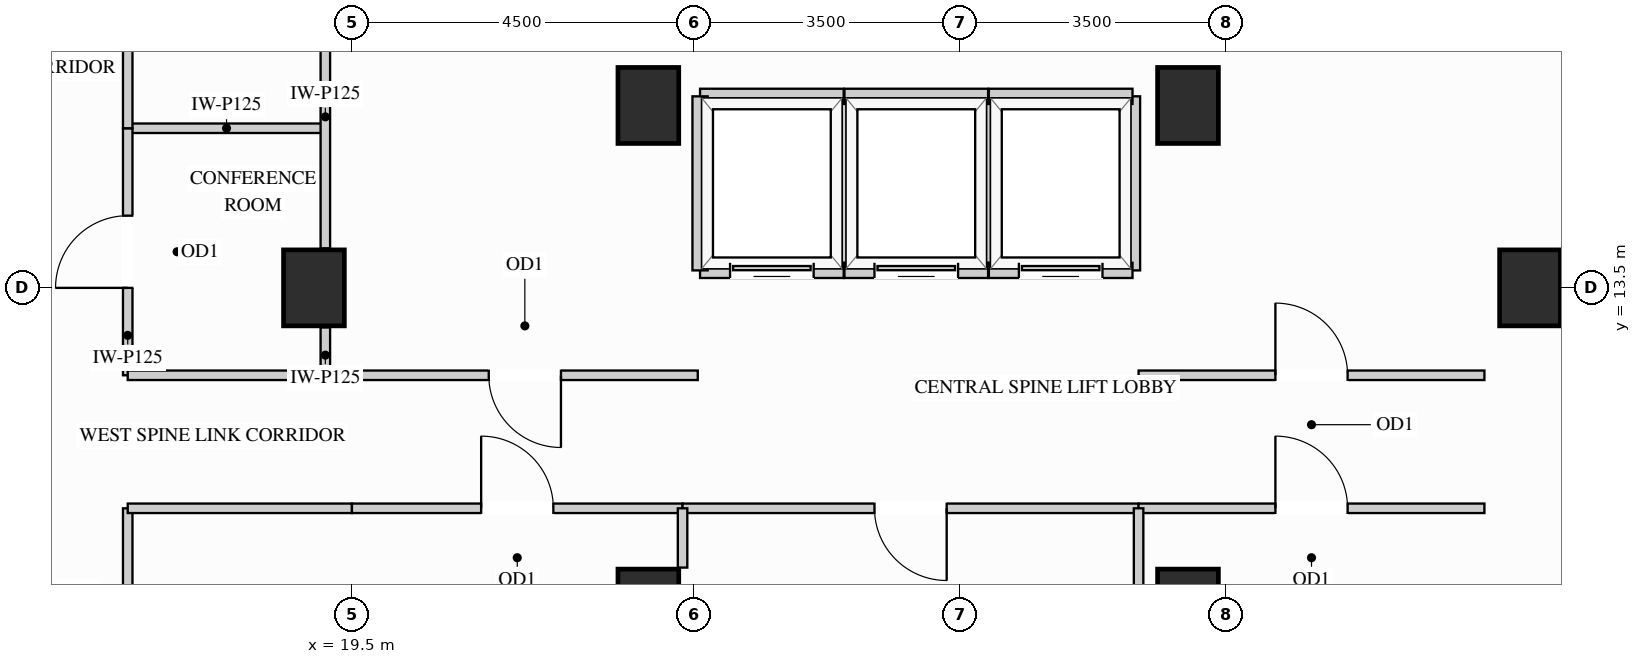
"""IFC4 building model, lengths in metres.
Left out: names, types, materials, properties, quantities, classifications, styles, units other than length and angle.
Written with IfcOpenShell. Run it as: python <this file> out.ifc"""

import sys

from ifc_helpers import new_model, si_unit, direction, frame, frame_2d, origin, origin_2d, place, context, subcontext, project, spatial, rectangle, extrude, source, transform, mapped, element, fill, save


model = new_model("IFC4")
c1 = context("Model", 3, precision=1e-05, world=origin(), true_north=direction((0.0, 1.0)))
c2 = subcontext(c1, "Body", "Model", "MODEL_VIEW")
j1 = project(units=[si_unit("LENGTHUNIT", "METRE"), si_unit("PLANEANGLEUNIT", "RADIAN")], contexts=[c1])
p1 = place(None, origin())
s1 = spatial("IfcSite", under=j1, at=p1, CompositionType="ELEMENT")
p2 = place(p1, origin())
s2 = spatial("IfcBuilding", under=s1, at=p2, CompositionType="ELEMENT")
p3 = place(p2, frame((0.0, 0.0, 204.3)))
s3 = spatial("IfcBuildingStorey", under=s2, at=p3, CompositionType="ELEMENT", Elevation=204.3)
m1 = source(origin(), c2, "Body", "SweptSolid", [
    extrude(rectangle(XDim=0.8, YDim=1.0, at=origin_2d()), origin(), (0.0, 0.0, 1.0), 3.32),
])
for number, where, z_axis, x_axis in (
    (1, (19.0, 13.5, 0.0), (0.0, 0.0, 1.0), (1.0, 0.0, 0.0)),
    (2, (35.0, 13.5, 0.0), (0.0, 0.0, 1.0), (1.0, 0.0, 0.0)),
    (3, (23.4, 15.9, 0.0), (0.0, 0.0, 1.0), (1.0, 0.0, 0.0)),
    (4, (23.4, 9.3, 0.0), (0.0, 0.0, 1.0), (1.0, 0.0, 0.0)),
    (5, (30.5, 15.9, 0.0), (0.0, 0.0, 1.0), (1.0, 0.0, 0.0)),
    (6, (30.5, 9.3, 0.0), (0.0, 0.0, 1.0), (1.0, 0.0, 0.0)),
):
    element("IfcColumn", number, at=place(p3, frame(where, z_axis=z_axis, x_axis=x_axis)), inside=s3, PredefinedType="COLUMN", context=c2, shape_type="MappedRepresentation", body=[
        mapped(m1, transform((0.0, 0.0, 0.0), x_axis=(1.0, 0.0, 0.0), y_axis=(0.0, 1.0, 0.0), z_axis=(0.0, 0.0, 1.0))),
    ])
m2 = source(origin(), c2, "Body", "SweptSolid", [
    extrude(rectangle(XDim=2.6, YDim=0.125, at=frame_2d((1.3, 0.0))), origin(), (0.0, 0.0, 1.0), 3.305),
])
p4 = place(p3, frame((16.55, 15.6, 0.0), z_axis=(0.0, 0.0, 1.0), x_axis=(1.0, 0.0, 0.0)))
e7 = element("IfcWall", 7, at=p4, inside=s3, PredefinedType="PARTITIONING", context=c2, shape_type="MappedRepresentation", body=[
    mapped(m2, transform((0.0, 0.0, 0.0), x_axis=(1.0, 0.0, 0.0), y_axis=(0.0, 1.0, 0.0), z_axis=(0.0, 0.0, 1.0))),
])
m3 = source(origin(), c2, "Body", "SweptSolid", [
    extrude(rectangle(XDim=0.63, YDim=0.125, at=frame_2d((0.315, 0.0))), origin(), (0.0, 0.0, 1.0), 2.693),
])
p5 = place(p3, frame((19.15, 12.35, 0.0), z_axis=(0.0, 0.0, 1.0), x_axis=(0.0, 1.0, 0.0)))
e8 = element("IfcWall", 8, at=p5, inside=s3, PredefinedType="PARTITIONING", context=c2, shape_type="MappedRepresentation", body=[
    mapped(m3, transform((0.0, 0.0, 0.0), x_axis=(1.0, 0.0, 0.0), y_axis=(0.0, 1.0, 0.0), z_axis=(0.0, 0.0, 1.0))),
])
m4 = source(origin(), c2, "Body", "SweptSolid", [
    extrude(rectangle(XDim=3.46, YDim=0.125, at=frame_2d((1.73, 0.0))), origin(), (0.0, 0.0, 1.0), 2.693),
])
p6 = place(p3, frame((19.15, 14.02, 0.0), z_axis=(0.0, 0.0, 1.0), x_axis=(0.0, 1.0, 0.0)))
e9 = element("IfcWall", 9, at=p6, inside=s3, PredefinedType="PARTITIONING", context=c2, shape_type="MappedRepresentation", body=[
    mapped(m4, transform((0.0, 0.0, 0.0), x_axis=(1.0, 0.0, 0.0), y_axis=(0.0, 1.0, 0.0), z_axis=(0.0, 0.0, 1.0))),
])
p7 = place(p3, frame((16.55, 12.35, 0.0), z_axis=(0.0, 0.0, 1.0), x_axis=(0.0, 1.0, 0.0)))
e10 = element("IfcWall", 10, at=p7, inside=s3, PredefinedType="PARTITIONING", context=c2, shape_type="SweptSolid", body=[
    extrude(rectangle(XDim=3.25, YDim=0.125, at=frame_2d((1.625, 0.0))), origin(), (0.0, 0.0, 1.0), 3.305),
])
p8 = place(p7, frame((1.15, 0.0, 0.0)))
e11 = element("IfcOpeningElement", 11, at=p8, cuts=e10, PredefinedType="OPENING", context=c2, shape_type="SweptSolid", body=[
    extrude(rectangle(XDim=0.95, YDim=2.15, at=frame_2d((0.475, 1.075))), frame((0.0, 0.073, 0.0), z_axis=(0.0, -1.0, 0.0), x_axis=(1.0, 0.0, 0.0)), (0.0, 0.0, 1.0), 0.145),
])
p9 = place(p3, frame((16.55, 15.6, 0.0), z_axis=(0.0, 0.0, 1.0), x_axis=(0.0, 1.0, 0.0)))
e12 = element("IfcWall", 12, at=p9, inside=s3, PredefinedType="PARTITIONING", context=c2, shape_type="SweptSolid", body=[
    extrude(rectangle(XDim=7.75, YDim=0.125, at=frame_2d((3.875, 0.0))), origin(), (0.0, 0.0, 1.0), 3.305),
])
p10 = place(p9, frame((3.4, 0.0, 0.0)))
e13 = element("IfcOpeningElement", 13, at=p10, cuts=e12, PredefinedType="OPENING", context=c2, shape_type="SweptSolid", body=[
    extrude(rectangle(XDim=0.95, YDim=2.15, at=frame_2d((0.475, 1.075))), frame((0.0, 0.073, 0.0), z_axis=(0.0, -1.0, 0.0), x_axis=(1.0, 0.0, 0.0)), (0.0, 0.0, 1.0), 0.145),
])
p11 = place(p3, frame((16.55, 6.2, 0.0), z_axis=(0.0, 0.0, 1.0), x_axis=(0.0, 1.0, 0.0)))
e14 = element("IfcWall", 14, at=p11, inside=s3, PredefinedType="PARTITIONING", context=c2, shape_type="SweptSolid", body=[
    extrude(rectangle(XDim=4.4, YDim=0.125, at=frame_2d((2.2, 0.0))), origin(), (0.0, 0.0, 1.0), 3.305),
])
p12 = place(p11, frame((1.725, 0.0, 0.0)))
e15 = element("IfcOpeningElement", 15, at=p12, cuts=e14, PredefinedType="OPENING", context=c2, shape_type="SweptSolid", body=[
    extrude(rectangle(XDim=0.95, YDim=2.15, at=frame_2d((0.475, 1.075))), frame((0.0, 0.073, 0.0), z_axis=(0.0, -1.0, 0.0), x_axis=(1.0, 0.0, 0.0)), (0.0, 0.0, 1.0), 0.145),
])
p13 = place(p3, frame((29.85, 12.35, 0.0), z_axis=(0.0, 0.0, 1.0), x_axis=(1.0, 0.0, 0.0)))
e16 = element("IfcWall", 16, at=p13, inside=s3, PredefinedType="PARTITIONING", context=c2, shape_type="SweptSolid", body=[
    extrude(rectangle(XDim=4.55, YDim=0.125, at=frame_2d((2.275, 0.0))), origin(), (0.0, 0.0, 1.0), 3.305),
])
p14 = place(p13, frame((1.8, 0.0, 0.0)))
e17 = element("IfcOpeningElement", 17, at=p14, cuts=e16, PredefinedType="OPENING", context=c2, shape_type="SweptSolid", body=[
    extrude(rectangle(XDim=0.95, YDim=2.15, at=frame_2d((0.475, 1.075))), frame((0.0, 0.073, 0.0), z_axis=(0.0, -1.0, 0.0), x_axis=(1.0, 0.0, 0.0)), (0.0, 0.0, 1.0), 0.145),
])
m5 = source(origin(), c2, "Body", "SweptSolid", [
    extrude(rectangle(XDim=2.95, YDim=0.125, at=frame_2d((1.475, 0.0))), origin(), (0.0, 0.0, 1.0), 3.305),
])
p15 = place(p3, frame((16.55, 12.35, 0.0), z_axis=(0.0, 0.0, 1.0), x_axis=(1.0, 0.0, 0.0)))
e18 = element("IfcWall", 18, at=p15, inside=s3, PredefinedType="PARTITIONING", context=c2, shape_type="MappedRepresentation", body=[
    mapped(m5, transform((0.0, 0.0, 0.0), x_axis=(1.0, 0.0, 0.0), y_axis=(0.0, 1.0, 0.0), z_axis=(0.0, 0.0, 1.0))),
])
p16 = place(p3, frame((19.5, 12.35, 0.0), z_axis=(0.0, 0.0, 1.0), x_axis=(1.0, 0.0, 0.0)))
e19 = element("IfcWall", 19, at=p16, inside=s3, PredefinedType="PARTITIONING", context=c2, shape_type="SweptSolid", body=[
    extrude(rectangle(XDim=4.55, YDim=0.125, at=frame_2d((2.275, 0.0))), origin(), (0.0, 0.0, 1.0), 3.305),
])
p17 = place(p16, frame((1.8, 0.0, 0.0)))
e20 = element("IfcOpeningElement", 20, at=p17, cuts=e19, PredefinedType="OPENING", context=c2, shape_type="SweptSolid", body=[
    extrude(rectangle(XDim=0.95, YDim=2.15, at=frame_2d((0.475, 1.075))), frame((0.0, 0.073, 0.0), z_axis=(0.0, -1.0, 0.0), x_axis=(1.0, 0.0, 0.0)), (0.0, 0.0, 1.0), 0.145),
])
p18 = place(p3, frame((16.55, 10.6, 0.0), z_axis=(0.0, 0.0, 1.0), x_axis=(1.0, 0.0, 0.0)))
e21 = element("IfcWall", 21, at=p18, inside=s3, PredefinedType="PARTITIONING", context=c2, shape_type="MappedRepresentation", body=[
    mapped(m5, transform((0.0, 0.0, 0.0), x_axis=(1.0, 0.0, 0.0), y_axis=(0.0, 1.0, 0.0), z_axis=(0.0, 0.0, 1.0))),
])
p19 = place(p3, frame((19.5, 10.6, 0.0), z_axis=(0.0, 0.0, 1.0), x_axis=(1.0, 0.0, 0.0)))
e22 = element("IfcWall", 22, at=p19, inside=s3, PredefinedType="PARTITIONING", context=c2, shape_type="SweptSolid", body=[
    extrude(rectangle(XDim=4.35, YDim=0.125, at=frame_2d((2.175, 0.0))), origin(), (0.0, 0.0, 1.0), 3.305),
])
p20 = place(p19, frame((1.7, 0.0, 0.0)))
e23 = element("IfcOpeningElement", 23, at=p20, cuts=e22, PredefinedType="OPENING", context=c2, shape_type="SweptSolid", body=[
    extrude(rectangle(XDim=0.95, YDim=2.15, at=frame_2d((0.475, 1.075))), frame((0.0, 0.073, 0.0), z_axis=(0.0, -1.0, 0.0), x_axis=(1.0, 0.0, 0.0)), (0.0, 0.0, 1.0), 0.145),
])
p21 = place(p3, frame((23.85, 10.6, 0.0), z_axis=(0.0, 0.0, 1.0), x_axis=(1.0, 0.0, 0.0)))
e24 = element("IfcWall", 24, at=p21, inside=s3, PredefinedType="PARTITIONING", context=c2, shape_type="SweptSolid", body=[
    extrude(rectangle(XDim=6.0, YDim=0.125, at=frame_2d((3.0, 0.0))), origin(), (0.0, 0.0, 1.0), 3.305),
])
p22 = place(p21, frame((2.525, 0.0, 0.0)))
e25 = element("IfcOpeningElement", 25, at=p22, cuts=e24, PredefinedType="OPENING", context=c2, shape_type="SweptSolid", body=[
    extrude(rectangle(XDim=0.95, YDim=2.15, at=frame_2d((0.475, 1.075))), frame((0.0, 0.073, 0.0), z_axis=(0.0, -1.0, 0.0), x_axis=(1.0, 0.0, 0.0)), (0.0, 0.0, 1.0), 0.145),
])
p23 = place(p3, frame((29.85, 10.6, 0.0), z_axis=(0.0, 0.0, 1.0), x_axis=(1.0, 0.0, 0.0)))
e26 = element("IfcWall", 26, at=p23, inside=s3, PredefinedType="PARTITIONING", context=c2, shape_type="SweptSolid", body=[
    extrude(rectangle(XDim=4.55, YDim=0.125, at=frame_2d((2.275, 0.0))), origin(), (0.0, 0.0, 1.0), 3.305),
])
p24 = place(p23, frame((1.8, 0.0, 0.0)))
e27 = element("IfcOpeningElement", 27, at=p24, cuts=e26, PredefinedType="OPENING", context=c2, shape_type="SweptSolid", body=[
    extrude(rectangle(XDim=0.95, YDim=2.15, at=frame_2d((0.475, 1.075))), frame((0.0, 0.073, 0.0), z_axis=(0.0, -1.0, 0.0), x_axis=(1.0, 0.0, 0.0)), (0.0, 0.0, 1.0), 0.145),
])
m6 = source(origin(), c2, "Body", "SweptSolid", [
    extrude(rectangle(XDim=0.78, YDim=0.125, at=frame_2d((0.39, 0.0))), origin(), (0.0, 0.0, 1.0), 3.305),
])
p25 = place(p3, frame((23.85, 9.82, 0.0), z_axis=(0.0, 0.0, 1.0), x_axis=(0.0, 1.0, 0.0)))
e28 = element("IfcWall", 28, at=p25, inside=s3, PredefinedType="PARTITIONING", context=c2, shape_type="MappedRepresentation", body=[
    mapped(m6, transform((0.0, 0.0, 0.0), x_axis=(1.0, 0.0, 0.0), y_axis=(0.0, 1.0, 0.0), z_axis=(0.0, 0.0, 1.0))),
])
m7 = source(origin(), c2, "Body", "SweptSolid", [
    extrude(rectangle(XDim=1.748, YDim=0.125, at=frame_2d((0.874, 0.0))), origin(), (0.0, 0.0, 1.0), 3.305),
])
p26 = place(p3, frame((29.85, 8.852, 0.0), z_axis=(0.0, 0.0, 1.0), x_axis=(0.0, 1.0, 0.0)))
e29 = element("IfcWall", 29, at=p26, inside=s3, PredefinedType="PARTITIONING", context=c2, shape_type="MappedRepresentation", body=[
    mapped(m7, transform((0.0, 0.0, 0.0), x_axis=(1.0, 0.0, 0.0), y_axis=(0.0, 1.0, 0.0), z_axis=(0.0, 0.0, 1.0))),
])
m8 = source(origin(), c2, "Body", "SweptSolid", [
    extrude(rectangle(XDim=2.29, YDim=0.2, at=frame_2d((1.145, 0.0))), origin(), (0.0, 0.0, 1.0), 3.305),
])
p27 = place(p3, frame((25.97, 13.73, 0.0), z_axis=(0.0, 0.0, 1.0), x_axis=(0.0, 1.0, 0.0)))
e30 = element("IfcWall", 30, at=p27, inside=s3, PredefinedType="PARTITIONING", context=c2, shape_type="MappedRepresentation", body=[
    mapped(m8, transform((0.0, 0.0, 0.0), x_axis=(1.0, 0.0, 0.0), y_axis=(0.0, 1.0, 0.0), z_axis=(0.0, 0.0, 1.0))),
])
m9 = source(origin(), c2, "Body", "SweptSolid", [
    extrude(rectangle(XDim=1.89, YDim=0.2, at=frame_2d((0.945, 0.0))), origin(), (0.0, 0.0, 1.0), 2.693),
])
p28 = place(p3, frame((24.08, 16.02, 0.0), z_axis=(0.0, 0.0, 1.0), x_axis=(1.0, 0.0, 0.0)))
e31 = element("IfcWall", 31, at=p28, inside=s3, PredefinedType="PARTITIONING", context=c2, shape_type="MappedRepresentation", body=[
    mapped(m9, transform((0.0, 0.0, 0.0), x_axis=(1.0, 0.0, 0.0), y_axis=(0.0, 1.0, 0.0), z_axis=(0.0, 0.0, 1.0))),
])
p29 = place(p3, frame((24.08, 13.73, 0.0), z_axis=(0.0, 0.0, 1.0), x_axis=(1.0, 0.0, 0.0)))
e32 = element("IfcWall", 32, at=p29, inside=s3, PredefinedType="PARTITIONING", context=c2, shape_type="SweptSolid", body=[
    extrude(rectangle(XDim=1.89, YDim=0.2, at=frame_2d((0.945, 0.0))), origin(), (0.0, 0.0, 1.0), 2.386),
])
p30 = place(p29, frame((0.395, 0.0, 0.0)))
e33 = element("IfcOpeningElement", 33, at=p30, cuts=e32, PredefinedType="OPENING", context=c2, shape_type="SweptSolid", body=[
    extrude(rectangle(XDim=1.1, YDim=2.2, at=frame_2d((0.55, 1.1))), frame((0.0, 0.11, 0.0), z_axis=(0.0, -1.0, 0.0), x_axis=(1.0, 0.0, 0.0)), (0.0, 0.0, 1.0), 0.22),
])
for number, where, z_axis, x_axis in (
    (34, (24.08, 13.73, 0.0), (0.0, 0.0, 1.0), (0.0, 1.0, 0.0)),
    (35, (27.87, 13.73, 0.0), (0.0, 0.0, 1.0), (0.0, 1.0, 0.0)),
):
    element("IfcWall", number, at=place(p3, frame(where, z_axis=z_axis, x_axis=x_axis)), inside=s3, PredefinedType="PARTITIONING", context=c2, shape_type="MappedRepresentation", body=[
        mapped(m8, transform((0.0, 0.0, 0.0), x_axis=(1.0, 0.0, 0.0), y_axis=(0.0, 1.0, 0.0), z_axis=(0.0, 0.0, 1.0))),
    ])
m10 = source(origin(), c2, "Body", "SweptSolid", [
    extrude(rectangle(XDim=1.89, YDim=0.2, at=frame_2d((0.945, 0.0))), origin(), (0.0, 0.0, 1.0), 2.693),
])
p31 = place(p3, frame((25.98, 16.02, 0.0), z_axis=(0.0, 0.0, 1.0), x_axis=(1.0, 0.0, 0.0)))
e36 = element("IfcWall", 36, at=p31, inside=s3, PredefinedType="PARTITIONING", context=c2, shape_type="MappedRepresentation", body=[
    mapped(m10, transform((0.0, 0.0, 0.0), x_axis=(1.0, 0.0, 0.0), y_axis=(0.0, 1.0, 0.0), z_axis=(0.0, 0.0, 1.0))),
])
p32 = place(p3, frame((25.98, 13.73, 0.0), z_axis=(0.0, 0.0, 1.0), x_axis=(1.0, 0.0, 0.0)))
e37 = element("IfcWall", 37, at=p32, inside=s3, PredefinedType="PARTITIONING", context=c2, shape_type="SweptSolid", body=[
    extrude(rectangle(XDim=1.89, YDim=0.2, at=frame_2d((0.945, 0.0))), origin(), (0.0, 0.0, 1.0), 2.386),
])
p33 = place(p32, frame((0.395, 0.0, 0.0)))
e38 = element("IfcOpeningElement", 38, at=p33, cuts=e37, PredefinedType="OPENING", context=c2, shape_type="SweptSolid", body=[
    extrude(rectangle(XDim=1.1, YDim=2.2, at=frame_2d((0.55, 1.1))), frame((0.0, 0.11, 0.0), z_axis=(0.0, -1.0, 0.0), x_axis=(1.0, 0.0, 0.0)), (0.0, 0.0, 1.0), 0.22),
])
p34 = place(p3, frame((29.77, 13.73, 0.0), z_axis=(0.0, 0.0, 1.0), x_axis=(0.0, 1.0, 0.0)))
e39 = element("IfcWall", 39, at=p34, inside=s3, PredefinedType="PARTITIONING", context=c2, shape_type="MappedRepresentation", body=[
    mapped(m8, transform((0.0, 0.0, 0.0), x_axis=(1.0, 0.0, 0.0), y_axis=(0.0, 1.0, 0.0), z_axis=(0.0, 0.0, 1.0))),
])
p35 = place(p3, frame((27.88, 16.02, 0.0), z_axis=(0.0, 0.0, 1.0), x_axis=(1.0, 0.0, 0.0)))
e40 = element("IfcWall", 40, at=p35, inside=s3, PredefinedType="PARTITIONING", context=c2, shape_type="MappedRepresentation", body=[
    mapped(m10, transform((0.0, 0.0, 0.0), x_axis=(1.0, 0.0, 0.0), y_axis=(0.0, 1.0, 0.0), z_axis=(0.0, 0.0, 1.0))),
])
p36 = place(p3, frame((27.88, 13.73, 0.0), z_axis=(0.0, 0.0, 1.0), x_axis=(1.0, 0.0, 0.0)))
e41 = element("IfcWall", 41, at=p36, inside=s3, PredefinedType="PARTITIONING", context=c2, shape_type="SweptSolid", body=[
    extrude(rectangle(XDim=1.89, YDim=0.2, at=frame_2d((0.945, 0.0))), origin(), (0.0, 0.0, 1.0), 2.386),
])
p37 = place(p36, frame((0.395, 0.0, 0.0)))
e42 = element("IfcOpeningElement", 42, at=p37, cuts=e41, PredefinedType="OPENING", context=c2, shape_type="SweptSolid", body=[
    extrude(rectangle(XDim=1.1, YDim=2.2, at=frame_2d((0.55, 1.1))), frame((0.0, 0.11, 0.0), z_axis=(0.0, -1.0, 0.0), x_axis=(1.0, 0.0, 0.0)), (0.0, 0.0, 1.0), 0.22),
])
m11 = source(origin(), c2, "Body", "SweptSolid", [
    extrude(rectangle(XDim=1.1, YDim=2.2, at=frame_2d((0.55, 1.1))), frame((0.0, 0.025, 0.0), z_axis=(0.0, -1.0, 0.0), x_axis=(1.0, 0.0, 0.0)), (0.0, 0.0, 1.0), 0.05),
])
p38 = place(p30, origin())
e43 = element("IfcDoor", 43, at=p38, inside=s3, OperationType="SLIDING_TO_LEFT", PredefinedType="DOOR", context=c2, shape_type="MappedRepresentation", body=[
    mapped(m11, transform((0.0, 0.0, 0.0), x_axis=(1.0, 0.0, 0.0), y_axis=(0.0, 1.0, 0.0), z_axis=(0.0, 0.0, 1.0))),
])
fill(e33, e43)
p39 = place(p33, origin())
e44 = element("IfcDoor", 44, at=p39, inside=s3, OperationType="SLIDING_TO_LEFT", PredefinedType="DOOR", context=c2, shape_type="MappedRepresentation", body=[
    mapped(m11, transform((0.0, 0.0, 0.0), x_axis=(1.0, 0.0, 0.0), y_axis=(0.0, 1.0, 0.0), z_axis=(0.0, 0.0, 1.0))),
])
fill(e38, e44)
p40 = place(p37, origin())
e45 = element("IfcDoor", 45, at=p40, inside=s3, OperationType="SLIDING_TO_LEFT", PredefinedType="DOOR", context=c2, shape_type="MappedRepresentation", body=[
    mapped(m11, transform((0.0, 0.0, 0.0), x_axis=(1.0, 0.0, 0.0), y_axis=(0.0, 1.0, 0.0), z_axis=(0.0, 0.0, 1.0))),
])
fill(e42, e45)
m12 = source(origin(), c2, "Body", "SweptSolid", [
    extrude(rectangle(XDim=0.95, YDim=2.15, at=frame_2d((0.475, 1.075))), frame((0.0, 0.025, 0.0), z_axis=(0.0, -1.0, 0.0), x_axis=(1.0, 0.0, 0.0)), (0.0, 0.0, 1.0), 0.05),
])
p41 = place(p8, origin())
e46 = element("IfcDoor", 46, at=p41, inside=s3, OperationType="SINGLE_SWING_LEFT", PredefinedType="DOOR", context=c2, shape_type="MappedRepresentation", body=[
    mapped(m12, transform((0.0, 0.0, 0.0), x_axis=(1.0, 0.0, 0.0), y_axis=(0.0, 1.0, 0.0), z_axis=(0.0, 0.0, 1.0))),
])
fill(e11, e46)
p42 = place(p17, origin())
e47 = element("IfcDoor", 47, at=p42, inside=s3, OperationType="SINGLE_SWING_RIGHT", PredefinedType="DOOR", context=c2, shape_type="MappedRepresentation", body=[
    mapped(m12, transform((0.0, 0.0, 0.0), x_axis=(1.0, 0.0, 0.0), y_axis=(0.0, 1.0, 0.0), z_axis=(0.0, 0.0, 1.0))),
])
fill(e20, e47)
p43 = place(p14, origin())
e48 = element("IfcDoor", 48, at=p43, inside=s3, OperationType="SINGLE_SWING_LEFT", PredefinedType="DOOR", context=c2, shape_type="MappedRepresentation", body=[
    mapped(m12, transform((0.0, 0.0, 0.0), x_axis=(1.0, 0.0, 0.0), y_axis=(0.0, 1.0, 0.0), z_axis=(0.0, 0.0, 1.0))),
])
fill(e17, e48)
p44 = place(p20, origin())
e49 = element("IfcDoor", 49, at=p44, inside=s3, OperationType="SINGLE_SWING_LEFT", PredefinedType="DOOR", context=c2, shape_type="MappedRepresentation", body=[
    mapped(m12, transform((0.0, 0.0, 0.0), x_axis=(1.0, 0.0, 0.0), y_axis=(0.0, 1.0, 0.0), z_axis=(0.0, 0.0, 1.0))),
])
fill(e23, e49)
p45 = place(p22, origin())
e50 = element("IfcDoor", 50, at=p45, inside=s3, OperationType="SINGLE_SWING_RIGHT", PredefinedType="DOOR", context=c2, shape_type="MappedRepresentation", body=[
    mapped(m12, transform((0.0, 0.0, 0.0), x_axis=(1.0, 0.0, 0.0), y_axis=(0.0, 1.0, 0.0), z_axis=(0.0, 0.0, 1.0))),
])
fill(e25, e50)
p46 = place(p24, origin())
e51 = element("IfcDoor", 51, at=p46, inside=s3, OperationType="SINGLE_SWING_LEFT", PredefinedType="DOOR", context=c2, shape_type="MappedRepresentation", body=[
    mapped(m12, transform((0.0, 0.0, 0.0), x_axis=(1.0, 0.0, 0.0), y_axis=(0.0, 1.0, 0.0), z_axis=(0.0, 0.0, 1.0))),
])
fill(e27, e51)
save(model, sys.argv[1])
